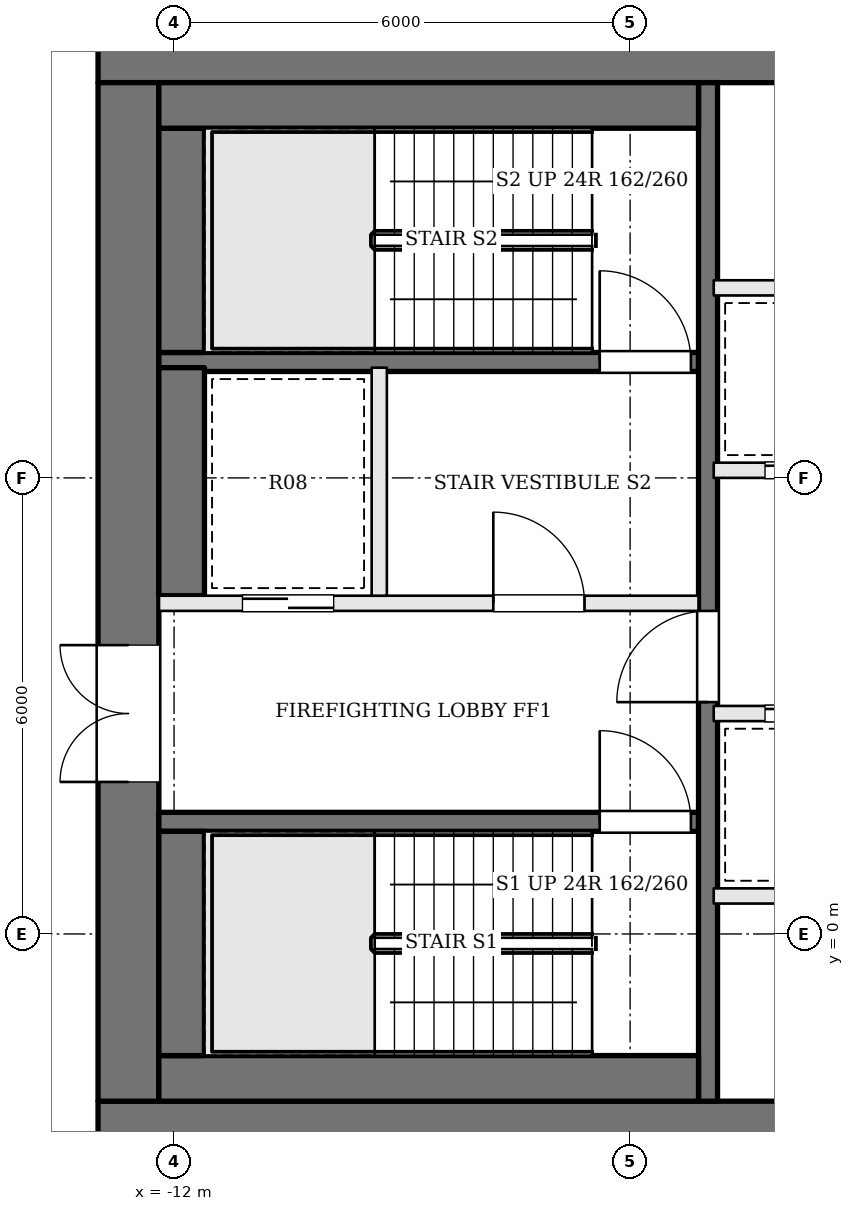
"""IFC4 building model, lengths in metres.
Left out: names, types, materials, properties, quantities, classifications, styles, units other than length and angle.
Written with IfcOpenShell. Run it as: python <this file> out.ifc"""

import sys

from ifc_helpers import new_model, si_unit, direction, frame, frame_2d, origin, place, context, subcontext, project, spatial, rectangle, extrude, element, fill, save


model = new_model("IFC4")
c1 = context("Model", 3, precision=1e-05, world=origin(), true_north=direction((0.0, 1.0)))
c2 = subcontext(c1, "Body", "Model", "MODEL_VIEW")
j1 = project(units=[si_unit("LENGTHUNIT", "METRE"), si_unit("PLANEANGLEUNIT", "RADIAN")], contexts=[c1])
p1 = place(None, origin())
s1 = spatial("IfcSite", under=j1, at=p1, CompositionType="ELEMENT")
p2 = place(p1, origin())
s2 = spatial("IfcBuilding", under=s1, at=p2, CompositionType="ELEMENT")
p3 = place(p2, frame((0.0, 0.0, 185.7)))
s3 = spatial("IfcBuildingStorey", under=s2, at=p3, CompositionType="ELEMENT", Elevation=185.7)
p4 = place(p3, frame((-13.0, 11.6, 0.0), z_axis=(0.0, 0.0, 1.0), x_axis=(1.0, 0.0, 0.0)))
e1 = element("IfcWall", 1, at=p4, inside=s3, PredefinedType="SHEAR", context=c2, shape_type="SweptSolid", body=[
    extrude(rectangle(XDim=26.0, YDim=0.8, at=frame_2d((13.0, 0.0))), origin(), (0.0, 0.0, 1.0), 3.9),
])
p5 = place(p4, frame((9.65, 0.0, 0.0)))
e2 = element("IfcOpeningElement", 2, at=p5, cuts=e1, PredefinedType="OPENING", context=c2, shape_type="SweptSolid", body=[
    extrude(rectangle(XDim=1.0, YDim=2.1, at=frame_2d((0.5, 1.05))), frame((0.0, 0.41, 0.0), z_axis=(0.0, -1.0, 0.0), x_axis=(1.0, 0.0, 0.0)), (0.0, 0.0, 1.0), 0.82),
])
p6 = place(p4, frame((12.675, 0.0, 0.0)))
e3 = element("IfcOpeningElement", 3, at=p6, cuts=e1, PredefinedType="OPENING", context=c2, shape_type="SweptSolid", body=[
    extrude(rectangle(XDim=0.7, YDim=2.1, at=frame_2d((0.35, 1.05))), frame((0.0, 0.41, 0.0), z_axis=(0.0, -1.0, 0.0), x_axis=(1.0, 0.0, 0.0)), (0.0, 0.0, 1.0), 0.82),
])
p7 = place(p4, frame((14.725, 0.0, 0.0)))
e4 = element("IfcOpeningElement", 4, at=p7, cuts=e1, PredefinedType="OPENING", context=c2, shape_type="SweptSolid", body=[
    extrude(rectangle(XDim=0.7, YDim=2.1, at=frame_2d((0.35, 1.05))), frame((0.0, 0.41, 0.0), z_axis=(0.0, -1.0, 0.0), x_axis=(1.0, 0.0, 0.0)), (0.0, 0.0, 1.0), 0.82),
])
p8 = place(p4, frame((16.6, 0.0, 0.0)))
e5 = element("IfcOpeningElement", 5, at=p8, cuts=e1, PredefinedType="OPENING", context=c2, shape_type="SweptSolid", body=[
    extrude(rectangle(XDim=1.0, YDim=2.1, at=frame_2d((0.5, 1.05))), frame((0.0, 0.41, 0.0), z_axis=(0.0, -1.0, 0.0), x_axis=(1.0, 0.0, 0.0)), (0.0, 0.0, 1.0), 0.82),
])
p9 = place(p3, frame((-13.0, -2.6, 0.0), z_axis=(0.0, 0.0, 1.0), x_axis=(1.0, 0.0, 0.0)))
e6 = element("IfcWall", 6, at=p9, inside=s3, PredefinedType="SHEAR", context=c2, shape_type="SweptSolid", body=[
    extrude(rectangle(XDim=26.0, YDim=0.8, at=frame_2d((13.0, 0.0))), origin(), (0.0, 0.0, 1.0), 3.9),
])
p10 = place(p9, frame((9.2, 0.0, 0.0)))
e7 = element("IfcOpeningElement", 7, at=p10, cuts=e6, PredefinedType="OPENING", context=c2, shape_type="SweptSolid", body=[
    extrude(rectangle(XDim=0.9, YDim=2.1, at=frame_2d((0.45, 1.05))), frame((0.0, 0.41, 0.0), z_axis=(0.0, -1.0, 0.0), x_axis=(1.0, 0.0, 0.0)), (0.0, 0.0, 1.0), 0.82),
])
p11 = place(p9, frame((12.3, 0.0, 0.0)))
e8 = element("IfcOpeningElement", 8, at=p11, cuts=e6, PredefinedType="OPENING", context=c2, shape_type="SweptSolid", body=[
    extrude(rectangle(XDim=0.9, YDim=2.1, at=frame_2d((0.45, 1.05))), frame((0.0, 0.41, 0.0), z_axis=(0.0, -1.0, 0.0), x_axis=(1.0, 0.0, 0.0)), (0.0, 0.0, 1.0), 0.82),
])
p12 = place(p9, frame((14.7, 0.0, 0.0)))
e9 = element("IfcOpeningElement", 9, at=p12, cuts=e6, PredefinedType="OPENING", context=c2, shape_type="SweptSolid", body=[
    extrude(rectangle(XDim=1.0, YDim=2.1, at=frame_2d((0.5, 1.05))), frame((0.0, 0.41, 0.0), z_axis=(0.0, -1.0, 0.0), x_axis=(1.0, 0.0, 0.0)), (0.0, 0.0, 1.0), 0.82),
])
p13 = place(p9, frame((16.55, 0.0, 0.0)))
e10 = element("IfcOpeningElement", 10, at=p13, cuts=e6, PredefinedType="OPENING", context=c2, shape_type="SweptSolid", body=[
    extrude(rectangle(XDim=0.9, YDim=2.1, at=frame_2d((0.45, 1.05))), frame((0.0, 0.41, 0.0), z_axis=(0.0, -1.0, 0.0), x_axis=(1.0, 0.0, 0.0)), (0.0, 0.0, 1.0), 0.82),
])
p14 = place(p3, frame((-12.6, -2.2, 0.0), z_axis=(0.0, 0.0, 1.0), x_axis=(0.0, 1.0, 0.0)))
e11 = element("IfcWall", 11, at=p14, inside=s3, PredefinedType="SHEAR", context=c2, shape_type="SweptSolid", body=[
    extrude(rectangle(XDim=13.4, YDim=0.8, at=frame_2d((6.7, 0.0))), origin(), (0.0, 0.0, 1.0), 3.9),
])
p15 = place(p14, frame((4.2, 0.0, 0.0)))
e12 = element("IfcOpeningElement", 12, at=p15, cuts=e11, PredefinedType="OPENING", context=c2, shape_type="SweptSolid", body=[
    extrude(rectangle(XDim=1.8, YDim=2.1, at=frame_2d((0.9, 1.05))), frame((0.0, 0.41, 0.0), z_axis=(0.0, -1.0, 0.0), x_axis=(1.0, 0.0, 0.0)), (0.0, 0.0, 1.0), 0.82),
])
p16 = place(p3, frame((-12.2, 1.475, 0.0), z_axis=(0.0, 0.0, 1.0), x_axis=(1.0, 0.0, 0.0)))
e13 = element("IfcWall", 13, at=p16, inside=s3, PredefinedType="SOLIDWALL", context=c2, shape_type="SweptSolid", body=[
    extrude(rectangle(XDim=7.1, YDim=0.25, at=frame_2d((3.55, 0.0))), origin(), (0.0, 0.0, 1.0), 3.7),
])
p17 = place(p16, frame((5.8, 0.0, 0.0)))
e14 = element("IfcOpeningElement", 14, at=p17, cuts=e13, PredefinedType="OPENING", context=c2, shape_type="SweptSolid", body=[
    extrude(rectangle(XDim=1.2, YDim=2.1, at=frame_2d((0.6, 1.05))), frame((0.0, 0.135, 0.0), z_axis=(0.0, -1.0, 0.0), x_axis=(1.0, 0.0, 0.0)), (0.0, 0.0, 1.0), 0.27),
])
p18 = place(p3, frame((-12.2, 4.35, 0.0), z_axis=(0.0, 0.0, 1.0), x_axis=(1.0, 0.0, 0.0)))
e15 = element("IfcWall", 15, at=p18, inside=s3, PredefinedType="SOLIDWALL", context=c2, shape_type="SweptSolid", body=[
    extrude(rectangle(XDim=7.1, YDim=0.2, at=frame_2d((3.55, 0.0))), origin(), (0.0, 0.0, 1.0), 3.7),
])
p19 = place(p18, frame((4.4, 0.0, 0.0)))
e16 = element("IfcOpeningElement", 16, at=p19, cuts=e15, PredefinedType="OPENING", context=c2, shape_type="SweptSolid", body=[
    extrude(rectangle(XDim=1.2, YDim=2.1, at=frame_2d((0.6, 1.05))), frame((0.0, 0.11, 0.0), z_axis=(0.0, -1.0, 0.0), x_axis=(1.0, 0.0, 0.0)), (0.0, 0.0, 1.0), 0.22),
])
p20 = place(p18, frame((1.1, 0.0, 0.0)))
e17 = element("IfcOpeningElement", 17, at=p20, cuts=e15, PredefinedType="OPENING", context=c2, shape_type="SweptSolid", body=[
    extrude(rectangle(XDim=1.2, YDim=2.1, at=frame_2d((0.6, 1.05))), frame((0.0, 0.11, 0.0), z_axis=(0.0, -1.0, 0.0), x_axis=(1.0, 0.0, 0.0)), (0.0, 0.0, 1.0), 0.22),
])
p21 = place(p3, frame((-12.2, 7.525, 0.0), z_axis=(0.0, 0.0, 1.0), x_axis=(1.0, 0.0, 0.0)))
e18 = element("IfcWall", 18, at=p21, inside=s3, PredefinedType="SOLIDWALL", context=c2, shape_type="SweptSolid", body=[
    extrude(rectangle(XDim=7.1, YDim=0.25, at=frame_2d((3.55, 0.0))), origin(), (0.0, 0.0, 1.0), 3.7),
])
p22 = place(p21, frame((5.8, 0.0, 0.0)))
e19 = element("IfcOpeningElement", 19, at=p22, cuts=e18, PredefinedType="OPENING", context=c2, shape_type="SweptSolid", body=[
    extrude(rectangle(XDim=1.2, YDim=2.1, at=frame_2d((0.6, 1.05))), frame((0.0, 0.135, 0.0), z_axis=(0.0, -1.0, 0.0), x_axis=(1.0, 0.0, 0.0)), (0.0, 0.0, 1.0), 0.27),
])
p23 = place(p3, frame((-9.3, 4.45, 0.0), z_axis=(0.0, 0.0, 1.0), x_axis=(0.0, 1.0, 0.0)))
e20 = element("IfcWall", 20, at=p23, inside=s3, PredefinedType="SOLIDWALL", context=c2, shape_type="SweptSolid", body=[
    extrude(rectangle(XDim=3.0, YDim=0.2, at=frame_2d((1.5, 0.0))), origin(), (0.0, 0.0, 1.0), 3.7),
])
p24 = place(p3, frame((-4.975, -2.2, 0.0), z_axis=(0.0, 0.0, 1.0), x_axis=(0.0, 1.0, 0.0)))
e21 = element("IfcWall", 21, at=p24, inside=s3, PredefinedType="SOLIDWALL", context=c2, shape_type="SweptSolid", body=[
    extrude(rectangle(XDim=13.4, YDim=0.25, at=frame_2d((6.7, 0.0))), origin(), (0.0, 0.0, 1.0), 3.7),
])
p25 = place(p24, frame((5.25, 0.0, 0.0)))
e22 = element("IfcOpeningElement", 22, at=p25, cuts=e21, PredefinedType="OPENING", context=c2, shape_type="SweptSolid", body=[
    extrude(rectangle(XDim=1.2, YDim=2.1, at=frame_2d((0.6, 1.05))), frame((0.0, 0.135, 0.0), z_axis=(0.0, -1.0, 0.0), x_axis=(1.0, 0.0, 0.0)), (0.0, 0.0, 1.0), 0.27),
])
p26 = place(p3, frame((-12.2, -1.9, 0.0), z_axis=(0.0, 0.0, 1.0), x_axis=(1.0, 0.0, 0.0)))
e23 = element("IfcWall", 23, at=p26, inside=s3, PredefinedType="SOLIDWALL", context=c2, shape_type="SweptSolid", body=[
    extrude(rectangle(XDim=7.1, YDim=0.6, at=frame_2d((3.55, 0.0))), origin(), (0.0, 0.0, 1.0), 3.7),
])
p27 = place(p3, frame((-11.9, -1.6, 0.0), z_axis=(0.0, 0.0, 1.0), x_axis=(0.0, 1.0, 0.0)))
e24 = element("IfcWall", 24, at=p27, inside=s3, PredefinedType="SOLIDWALL", context=c2, shape_type="SweptSolid", body=[
    extrude(rectangle(XDim=2.95, YDim=0.6, at=frame_2d((1.475, 0.0))), origin(), (0.0, 0.0, 1.0), 3.7),
])
p28 = place(p3, frame((-11.9, 4.45, 0.0), z_axis=(0.0, 0.0, 1.0), x_axis=(0.0, 1.0, 0.0)))
e25 = element("IfcWall", 25, at=p28, inside=s3, PredefinedType="SOLIDWALL", context=c2, shape_type="SweptSolid", body=[
    extrude(rectangle(XDim=3.0, YDim=0.6, at=frame_2d((1.5, 0.0))), origin(), (0.0, 0.0, 1.0), 3.7),
])
p29 = place(p3, frame((-11.9, 7.65, 0.0), z_axis=(0.0, 0.0, 1.0), x_axis=(0.0, 1.0, 0.0)))
e26 = element("IfcWall", 26, at=p29, inside=s3, PredefinedType="SOLIDWALL", context=c2, shape_type="SweptSolid", body=[
    extrude(rectangle(XDim=2.95, YDim=0.6, at=frame_2d((1.475, 0.0))), origin(), (0.0, 0.0, 1.0), 3.7),
])
p30 = place(p3, frame((-12.2, 10.9, 0.0), z_axis=(0.0, 0.0, 1.0), x_axis=(1.0, 0.0, 0.0)))
e27 = element("IfcWall", 27, at=p30, inside=s3, PredefinedType="SOLIDWALL", context=c2, shape_type="SweptSolid", body=[
    extrude(rectangle(XDim=7.1, YDim=0.6, at=frame_2d((3.55, 0.0))), origin(), (0.0, 0.0, 1.0), 3.7),
])
p31 = place(p3, frame((-4.9, 0.5, 0.0), z_axis=(0.0, 0.0, 1.0), x_axis=(1.0, 0.0, 0.0)))
e28 = element("IfcWall", 28, at=p31, inside=s3, PredefinedType="SOLIDWALL", context=c2, shape_type="SweptSolid", body=[
    extrude(rectangle(XDim=9.8, YDim=0.2, at=frame_2d((4.9, 0.0))), origin(), (0.0, 0.0, 1.0), 3.7),
])
p32 = place(p3, frame((-4.9, 2.9, 0.0), z_axis=(0.0, 0.0, 1.0), x_axis=(1.0, 0.0, 0.0)))
e29 = element("IfcWall", 29, at=p32, inside=s3, PredefinedType="SOLIDWALL", context=c2, shape_type="SweptSolid", body=[
    extrude(rectangle(XDim=9.8, YDim=0.2, at=frame_2d((4.9, 0.0))), origin(), (0.0, 0.0, 1.0), 3.7),
])
p33 = place(p32, frame((0.675, 0.0, 0.0)))
e30 = element("IfcOpeningElement", 30, at=p33, cuts=e29, PredefinedType="OPENING", context=c2, shape_type="SweptSolid", body=[
    extrude(rectangle(XDim=1.1, YDim=2.1, at=frame_2d((0.55, 1.05))), frame((0.0, 0.11, 0.0), z_axis=(0.0, -1.0, 0.0), x_axis=(1.0, 0.0, 0.0)), (0.0, 0.0, 1.0), 0.22),
])
p34 = place(p32, frame((2.613, 0.0, 0.0)))
e31 = element("IfcOpeningElement", 31, at=p34, cuts=e29, PredefinedType="OPENING", context=c2, shape_type="SweptSolid", body=[
    extrude(rectangle(XDim=0.9, YDim=2.1, at=frame_2d((0.45, 1.05))), frame((0.0, 0.11, 0.0), z_axis=(0.0, -1.0, 0.0), x_axis=(1.0, 0.0, 0.0)), (0.0, 0.0, 1.0), 0.22),
])
p35 = place(p32, frame((4.35, 0.0, 0.0)))
e32 = element("IfcOpeningElement", 32, at=p35, cuts=e29, PredefinedType="OPENING", context=c2, shape_type="SweptSolid", body=[
    extrude(rectangle(XDim=1.1, YDim=2.1, at=frame_2d((0.55, 1.05))), frame((0.0, 0.11, 0.0), z_axis=(0.0, -1.0, 0.0), x_axis=(1.0, 0.0, 0.0)), (0.0, 0.0, 1.0), 0.22),
])
p36 = place(p32, frame((7.463, 0.0, 0.0)))
e33 = element("IfcOpeningElement", 33, at=p36, cuts=e29, PredefinedType="OPENING", context=c2, shape_type="SweptSolid", body=[
    extrude(rectangle(XDim=1.0, YDim=2.1, at=frame_2d((0.5, 1.05))), frame((0.0, 0.11, 0.0), z_axis=(0.0, -1.0, 0.0), x_axis=(1.0, 0.0, 0.0)), (0.0, 0.0, 1.0), 0.22),
])
p37 = place(p3, frame((-4.9, 6.1, 0.0), z_axis=(0.0, 0.0, 1.0), x_axis=(1.0, 0.0, 0.0)))
e34 = element("IfcWall", 34, at=p37, inside=s3, PredefinedType="SOLIDWALL", context=c2, shape_type="SweptSolid", body=[
    extrude(rectangle(XDim=9.8, YDim=0.2, at=frame_2d((4.9, 0.0))), origin(), (0.0, 0.0, 1.0), 3.7),
])
p38 = place(p37, frame((0.675, 0.0, 0.0)))
e35 = element("IfcOpeningElement", 35, at=p38, cuts=e34, PredefinedType="OPENING", context=c2, shape_type="SweptSolid", body=[
    extrude(rectangle(XDim=1.1, YDim=2.1, at=frame_2d((0.55, 1.05))), frame((0.0, 0.11, 0.0), z_axis=(0.0, -1.0, 0.0), x_axis=(1.0, 0.0, 0.0)), (0.0, 0.0, 1.0), 0.22),
])
p39 = place(p37, frame((3.125, 0.0, 0.0)))
e36 = element("IfcOpeningElement", 36, at=p39, cuts=e34, PredefinedType="OPENING", context=c2, shape_type="SweptSolid", body=[
    extrude(rectangle(XDim=1.1, YDim=2.1, at=frame_2d((0.55, 1.05))), frame((0.0, 0.11, 0.0), z_axis=(0.0, -1.0, 0.0), x_axis=(1.0, 0.0, 0.0)), (0.0, 0.0, 1.0), 0.22),
])
p40 = place(p37, frame((5.575, 0.0, 0.0)))
e37 = element("IfcOpeningElement", 37, at=p40, cuts=e34, PredefinedType="OPENING", context=c2, shape_type="SweptSolid", body=[
    extrude(rectangle(XDim=1.1, YDim=2.1, at=frame_2d((0.55, 1.05))), frame((0.0, 0.11, 0.0), z_axis=(0.0, -1.0, 0.0), x_axis=(1.0, 0.0, 0.0)), (0.0, 0.0, 1.0), 0.22),
])
p41 = place(p37, frame((8.025, 0.0, 0.0)))
e38 = element("IfcOpeningElement", 38, at=p41, cuts=e34, PredefinedType="OPENING", context=c2, shape_type="SweptSolid", body=[
    extrude(rectangle(XDim=1.1, YDim=2.1, at=frame_2d((0.55, 1.05))), frame((0.0, 0.11, 0.0), z_axis=(0.0, -1.0, 0.0), x_axis=(1.0, 0.0, 0.0)), (0.0, 0.0, 1.0), 0.22),
])
p42 = place(p3, frame((-4.9, 8.5, 0.0), z_axis=(0.0, 0.0, 1.0), x_axis=(1.0, 0.0, 0.0)))
e39 = element("IfcWall", 39, at=p42, inside=s3, PredefinedType="SOLIDWALL", context=c2, shape_type="SweptSolid", body=[
    extrude(rectangle(XDim=9.8, YDim=0.2, at=frame_2d((4.9, 0.0))), origin(), (0.0, 0.0, 1.0), 3.7),
])
p43 = place(p15, origin())
e40 = element("IfcDoor", 40, at=p43, inside=s3, OperationType="DOUBLE_DOOR_SINGLE_SWING", PredefinedType="DOOR", context=c2, shape_type="SweptSolid", body=[
    extrude(rectangle(XDim=1.8, YDim=2.1, at=frame_2d((0.9, 1.05))), frame((0.0, 0.025, 0.0), z_axis=(0.0, -1.0, 0.0), x_axis=(1.0, 0.0, 0.0)), (0.0, 0.0, 1.0), 0.05),
])
fill(e12, e40)
p44 = place(p25, origin())
e41 = element("IfcDoor", 41, at=p44, inside=s3, OperationType="SINGLE_SWING_LEFT", PredefinedType="DOOR", context=c2, shape_type="SweptSolid", body=[
    extrude(rectangle(XDim=1.2, YDim=2.1, at=frame_2d((0.6, 1.05))), frame((0.0, 0.025, 0.0), z_axis=(0.0, -1.0, 0.0), x_axis=(1.0, 0.0, 0.0)), (0.0, 0.0, 1.0), 0.05),
])
fill(e22, e41)
p45 = place(p19, origin())
e42 = element("IfcDoor", 42, at=p45, inside=s3, OperationType="SINGLE_SWING_LEFT", PredefinedType="DOOR", context=c2, shape_type="SweptSolid", body=[
    extrude(rectangle(XDim=1.2, YDim=2.1, at=frame_2d((0.6, 1.05))), frame((0.0, 0.025, 0.0), z_axis=(0.0, -1.0, 0.0), x_axis=(1.0, 0.0, 0.0)), (0.0, 0.0, 1.0), 0.05),
])
fill(e16, e42)
p46 = place(p17, origin())
e43 = element("IfcDoor", 43, at=p46, inside=s3, OperationType="SINGLE_SWING_LEFT", PredefinedType="DOOR", context=c2, shape_type="SweptSolid", body=[
    extrude(rectangle(XDim=1.2, YDim=2.1, at=frame_2d((0.6, 1.05))), frame((0.0, 0.025, 0.0), z_axis=(0.0, -1.0, 0.0), x_axis=(1.0, 0.0, 0.0)), (0.0, 0.0, 1.0), 0.05),
])
fill(e14, e43)
p47 = place(p22, origin())
e44 = element("IfcDoor", 44, at=p47, inside=s3, OperationType="SINGLE_SWING_LEFT", PredefinedType="DOOR", context=c2, shape_type="SweptSolid", body=[
    extrude(rectangle(XDim=1.2, YDim=2.1, at=frame_2d((0.6, 1.05))), frame((0.0, 0.025, 0.0), z_axis=(0.0, -1.0, 0.0), x_axis=(1.0, 0.0, 0.0)), (0.0, 0.0, 1.0), 0.05),
])
fill(e19, e44)
p48 = place(p20, origin())
e45 = element("IfcDoor", 45, at=p48, inside=s3, OperationType="SLIDING_TO_RIGHT", PredefinedType="DOOR", context=c2, shape_type="SweptSolid", body=[
    extrude(rectangle(XDim=1.2, YDim=2.1, at=frame_2d((0.6, 1.05))), frame((0.0, 0.025, 0.0), z_axis=(0.0, -1.0, 0.0), x_axis=(1.0, 0.0, 0.0)), (0.0, 0.0, 1.0), 0.05),
])
fill(e17, e45)
p49 = place(p33, origin())
e46 = element("IfcDoor", 46, at=p49, inside=s3, OperationType="SLIDING_TO_RIGHT", PredefinedType="DOOR", context=c2, shape_type="SweptSolid", body=[
    extrude(rectangle(XDim=1.1, YDim=2.1, at=frame_2d((0.55, 1.05))), frame((0.0, 0.025, 0.0), z_axis=(0.0, -1.0, 0.0), x_axis=(1.0, 0.0, 0.0)), (0.0, 0.0, 1.0), 0.05),
])
fill(e30, e46)
p50 = place(p38, origin())
e47 = element("IfcDoor", 47, at=p50, inside=s3, OperationType="SLIDING_TO_RIGHT", PredefinedType="DOOR", context=c2, shape_type="SweptSolid", body=[
    extrude(rectangle(XDim=1.1, YDim=2.1, at=frame_2d((0.55, 1.05))), frame((0.0, 0.025, 0.0), z_axis=(0.0, -1.0, 0.0), x_axis=(1.0, 0.0, 0.0)), (0.0, 0.0, 1.0), 0.05),
])
fill(e35, e47)
save(model, sys.argv[1])
